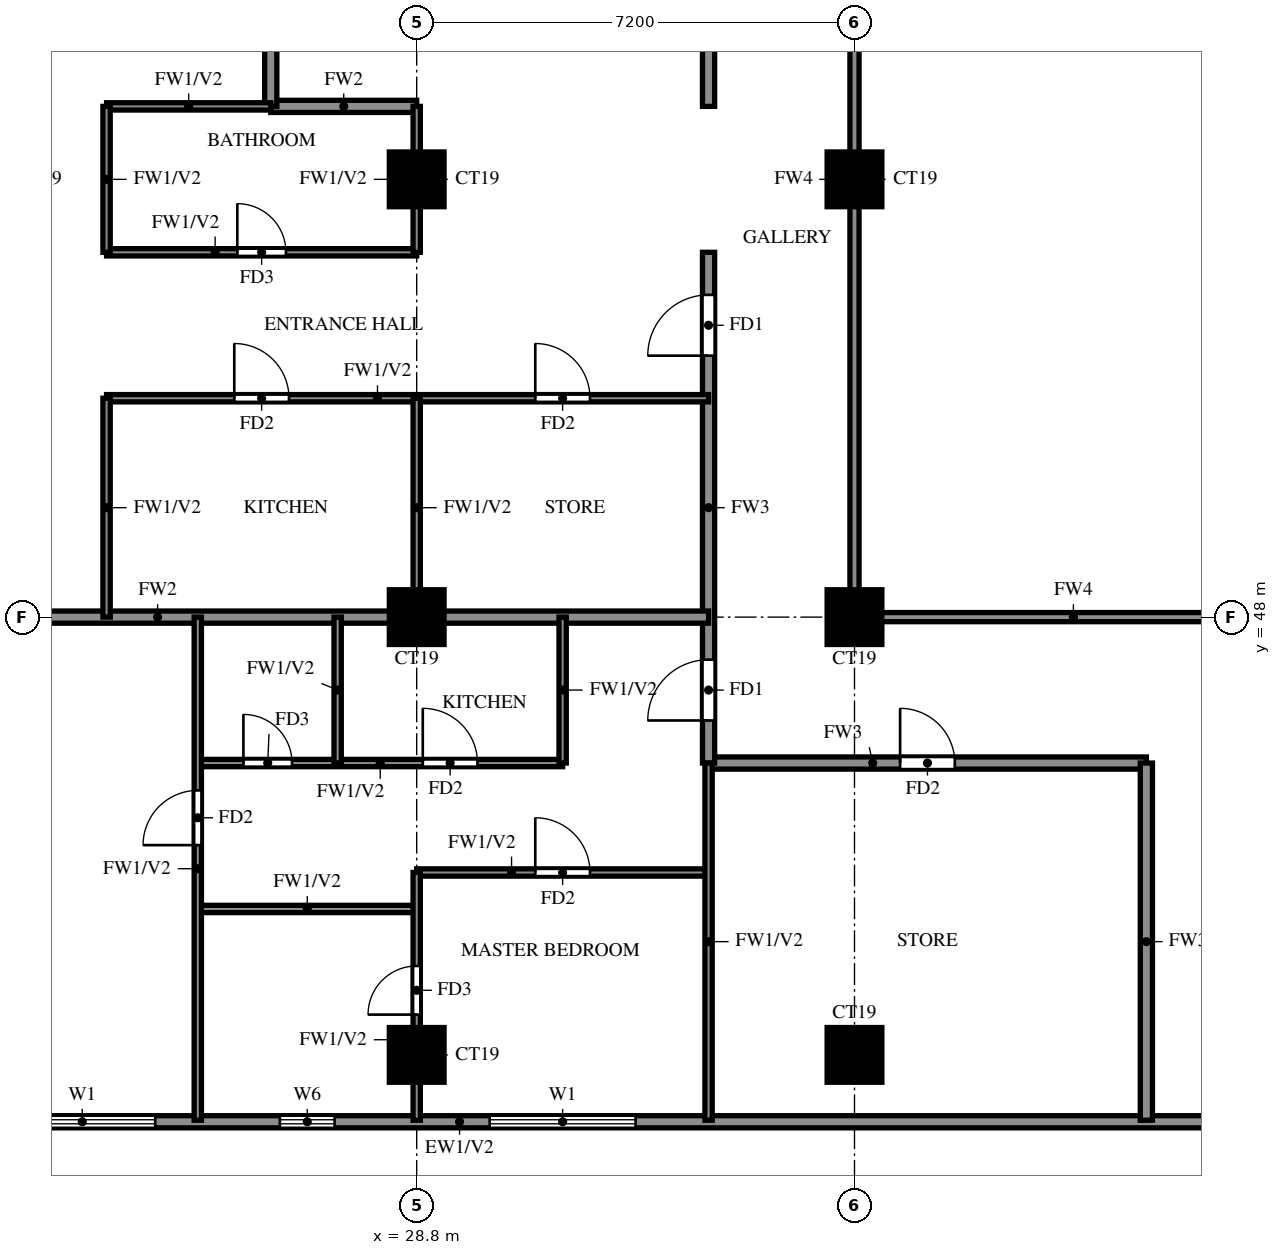
"""IFC4 building model, lengths in metres.
Left out: names, types, materials, properties, quantities, classifications, styles, units other than length and angle.
Written with IfcOpenShell. Run it as: python <this file> out.ifc"""

import sys

from ifc_helpers import new_model, si_unit, direction, frame, frame_2d, origin, origin_2d, place, context, subcontext, project, spatial, rectangle, extrude, source, transform, mapped, element, fill, save


model = new_model("IFC4")
c1 = context("Model", 3, precision=1e-05, world=origin(), true_north=direction((0.0, 1.0)))
c2 = subcontext(c1, "Body", "Model", "MODEL_VIEW")
j1 = project(units=[si_unit("LENGTHUNIT", "METRE"), si_unit("PLANEANGLEUNIT", "RADIAN")], contexts=[c1])
p1 = place(None, origin())
s1 = spatial("IfcSite", under=j1, at=p1, CompositionType="ELEMENT")
p2 = place(p1, origin())
s2 = spatial("IfcBuilding", under=s1, at=p2, CompositionType="ELEMENT")
p3 = place(p2, frame((0.0, 0.0, 185.0)))
s3 = spatial("IfcBuildingStorey", under=s2, at=p3, CompositionType="ELEMENT", Elevation=185.0)
m1 = source(origin(), c2, "Body", "SweptSolid", [
    extrude(rectangle(XDim=0.9, YDim=0.9, at=origin_2d()), origin(), (0.0, 0.0, 1.0), 3.2),
])
for number, where, z_axis, x_axis in (
    (1, (28.8, 40.8, 0.0), (0.0, 0.0, 1.0), (1.0, 0.0, 0.0)),
    (2, (36.0, 40.8, 0.0), (0.0, 0.0, 1.0), (1.0, 0.0, 0.0)),
    (3, (28.8, 48.0, 0.0), (0.0, 0.0, 1.0), (1.0, 0.0, 0.0)),
    (4, (36.0, 48.0, 0.0), (0.0, 0.0, 1.0), (1.0, 0.0, 0.0)),
    (5, (28.8, 55.2, 0.0), (0.0, 0.0, 1.0), (1.0, 0.0, 0.0)),
    (6, (36.0, 55.2, 0.0), (0.0, 0.0, 1.0), (1.0, 0.0, 0.0)),
):
    element("IfcColumn", number, at=place(p3, frame(where, z_axis=z_axis, x_axis=x_axis)), inside=s3, PredefinedType="COLUMN", context=c2, shape_type="MappedRepresentation", body=[
        mapped(m1, transform((0.0, 0.0, 0.0))),
    ])
p4 = place(p3, frame((18.2, 39.7, 0.0), z_axis=(0.0, 0.0, 1.0), x_axis=(1.0, 0.0, 0.0)))
e7 = element("IfcWall", 7, at=p4, inside=s3, PredefinedType="SOLIDWALL", context=c2, shape_type="SweptSolid", body=[
    extrude(rectangle(XDim=23.8, YDim=0.2, at=frame_2d((11.9, 0.0))), origin(), (0.0, 0.0, 1.0), 3.2),
])
p5 = place(p4, frame((0.9, 0.0, 0.6)))
e8 = element("IfcOpeningElement", 8, at=p5, cuts=e7, PredefinedType="OPENING", context=c2, shape_type="SweptSolid", body=[
    extrude(rectangle(XDim=2.4, YDim=2.4, at=frame_2d((1.2, 1.2))), frame((0.0, 0.11, 0.0), z_axis=(0.0, -1.0, 0.0), x_axis=(1.0, 0.0, 0.0)), (0.0, 0.0, 1.0), 0.22),
])
p6 = place(p4, frame((3.9, 0.0, 0.6)))
e9 = element("IfcOpeningElement", 9, at=p6, cuts=e7, PredefinedType="OPENING", context=c2, shape_type="SweptSolid", body=[
    extrude(rectangle(XDim=2.4, YDim=2.4, at=frame_2d((1.2, 1.2))), frame((0.0, 0.11, 0.0), z_axis=(0.0, -1.0, 0.0), x_axis=(1.0, 0.0, 0.0)), (0.0, 0.0, 1.0), 0.22),
])
p7 = place(p4, frame((11.8, 0.0, 0.6)))
e10 = element("IfcOpeningElement", 10, at=p7, cuts=e7, PredefinedType="OPENING", context=c2, shape_type="SweptSolid", body=[
    extrude(rectangle(XDim=2.4, YDim=2.4, at=frame_2d((1.2, 1.2))), frame((0.0, 0.11, 0.0), z_axis=(0.0, -1.0, 0.0), x_axis=(1.0, 0.0, 0.0)), (0.0, 0.0, 1.0), 0.22),
])
p8 = place(p4, frame((8.35, 0.0, 1.5)))
e11 = element("IfcOpeningElement", 11, at=p8, cuts=e7, PredefinedType="OPENING", context=c2, shape_type="SweptSolid", body=[
    extrude(rectangle(XDim=0.9, YDim=0.9, at=frame_2d((0.45, 0.45))), frame((0.0, 0.11, 0.0), z_axis=(0.0, -1.0, 0.0), x_axis=(1.0, 0.0, 0.0)), (0.0, 0.0, 1.0), 0.22),
])
p9 = place(p3, frame((33.6, 45.6, 0.0), z_axis=(0.0, 0.0, 1.0), x_axis=(1.0, 0.0, 0.0)))
e12 = element("IfcWall", 12, at=p9, inside=s3, PredefinedType="SOLIDWALL", context=c2, shape_type="SweptSolid", body=[
    extrude(rectangle(XDim=7.2, YDim=0.2, at=frame_2d((3.6, 0.0))), origin(), (0.0, 0.0, 1.0), 3.2),
])
p10 = place(p9, frame((3.15, 0.0, 0.0)))
e13 = element("IfcOpeningElement", 13, at=p10, cuts=e12, PredefinedType="OPENING", context=c2, shape_type="SweptSolid", body=[
    extrude(rectangle(XDim=0.9, YDim=2.1, at=frame_2d((0.45, 1.05))), frame((0.0, 0.11, 0.0), z_axis=(0.0, -1.0, 0.0), x_axis=(1.0, 0.0, 0.0)), (0.0, 0.0, 1.0), 0.22),
])
p11 = place(p3, frame((33.6, 45.6, 0.0), z_axis=(0.0, 0.0, 1.0), x_axis=(0.0, 1.0, 0.0)))
e14 = element("IfcWall", 14, at=p11, inside=s3, PredefinedType="SOLIDWALL", context=c2, shape_type="SweptSolid", body=[
    extrude(rectangle(XDim=8.4, YDim=0.2, at=frame_2d((4.2, 0.0))), origin(), (0.0, 0.0, 1.0), 3.2),
])
p12 = place(p11, frame((0.7, 0.0, 0.0)))
e15 = element("IfcOpeningElement", 15, at=p12, cuts=e14, PredefinedType="OPENING", context=c2, shape_type="SweptSolid", body=[
    extrude(rectangle(XDim=1.0, YDim=2.1, at=frame_2d((0.5, 1.05))), frame((0.0, 0.11, 0.0), z_axis=(0.0, -1.0, 0.0), x_axis=(1.0, 0.0, 0.0)), (0.0, 0.0, 1.0), 0.22),
])
p13 = place(p11, frame((6.7, 0.0, 0.0)))
e16 = element("IfcOpeningElement", 16, at=p13, cuts=e14, PredefinedType="OPENING", context=c2, shape_type="SweptSolid", body=[
    extrude(rectangle(XDim=1.0, YDim=2.1, at=frame_2d((0.5, 1.05))), frame((0.0, 0.11, 0.0), z_axis=(0.0, -1.0, 0.0), x_axis=(1.0, 0.0, 0.0)), (0.0, 0.0, 1.0), 0.22),
])
p14 = place(p3, frame((33.6, 56.4, 0.0), z_axis=(0.0, 0.0, 1.0), x_axis=(0.0, 1.0, 0.0)))
e17 = element("IfcWall", 17, at=p14, inside=s3, PredefinedType="SOLIDWALL", context=c2, shape_type="SweptSolid", body=[
    extrude(rectangle(XDim=6.0, YDim=0.2, at=frame_2d((3.0, 0.0))), origin(), (0.0, 0.0, 1.0), 3.2),
])
p15 = place(p14, frame((3.7, 0.0, 0.0)))
e18 = element("IfcOpeningElement", 18, at=p15, cuts=e17, PredefinedType="OPENING", context=c2, shape_type="SweptSolid", body=[
    extrude(rectangle(XDim=1.0, YDim=2.1, at=frame_2d((0.5, 1.05))), frame((0.0, 0.11, 0.0), z_axis=(0.0, -1.0, 0.0), x_axis=(1.0, 0.0, 0.0)), (0.0, 0.0, 1.0), 0.22),
])
p16 = place(p3, frame((40.8, 39.725, 0.0), z_axis=(0.0, 0.0, 1.0), x_axis=(0.0, 1.0, 0.0)))
e19 = element("IfcWall", 19, at=p16, inside=s3, PredefinedType="SOLIDWALL", context=c2, shape_type="SweptSolid", body=[
    extrude(rectangle(XDim=5.875, YDim=0.2, at=frame_2d((2.938, 0.0))), origin(), (0.0, 0.0, 1.0), 3.2),
])
p17 = place(p3, frame((14.525, 48.0, 0.0), z_axis=(0.0, 0.0, 1.0), x_axis=(1.0, 0.0, 0.0)))
e20 = element("IfcWall", 20, at=p17, inside=s3, PredefinedType="SOLIDWALL", context=c2, shape_type="SweptSolid", body=[
    extrude(rectangle(XDim=19.075, YDim=0.2, at=frame_2d((9.538, 0.0))), origin(), (0.0, 0.0, 1.0), 3.2),
])
for number, where, z_axis, x_axis in (
    (21, (26.4, 56.4, 0.0), (0.0, 0.0, 1.0), (1.0, 0.0, 0.0)),
    (22, (26.4, 56.4, 0.0), (0.0, 0.0, 1.0), (0.0, 1.0, 0.0)),
):
    element("IfcWall", number, at=place(p3, frame(where, z_axis=z_axis, x_axis=x_axis)), inside=s3, PredefinedType="SOLIDWALL", context=c2, shape_type="SweptSolid", body=[
        extrude(rectangle(XDim=2.4, YDim=0.2, at=frame_2d((1.2, 0.0))), origin(), (0.0, 0.0, 1.0), 3.2),
    ])
p18 = place(p3, frame((25.2, 43.2, 0.0), z_axis=(0.0, 0.0, 1.0), x_axis=(1.0, 0.0, 0.0)))
e23 = element("IfcWall", 23, at=p18, inside=s3, PredefinedType="PARTITIONING", context=c2, shape_type="SweptSolid", body=[
    extrude(rectangle(XDim=3.6, YDim=0.12, at=frame_2d((1.8, 0.0))), origin(), (0.0, 0.0, 1.0), 3.2),
])
p19 = place(p3, frame((28.8, 43.8, 0.0), z_axis=(0.0, 0.0, 1.0), x_axis=(1.0, 0.0, 0.0)))
e24 = element("IfcWall", 24, at=p19, inside=s3, PredefinedType="PARTITIONING", context=c2, shape_type="SweptSolid", body=[
    extrude(rectangle(XDim=4.8, YDim=0.12, at=frame_2d((2.4, 0.0))), origin(), (0.0, 0.0, 1.0), 3.2),
])
p20 = place(p19, frame((1.95, 0.0, 0.0)))
e25 = element("IfcOpeningElement", 25, at=p20, cuts=e24, PredefinedType="OPENING", context=c2, shape_type="SweptSolid", body=[
    extrude(rectangle(XDim=0.9, YDim=2.1, at=frame_2d((0.45, 1.05))), frame((0.0, 0.07, 0.0), z_axis=(0.0, -1.0, 0.0), x_axis=(1.0, 0.0, 0.0)), (0.0, 0.0, 1.0), 0.14),
])
p21 = place(p3, frame((25.2, 45.6, 0.0), z_axis=(0.0, 0.0, 1.0), x_axis=(1.0, 0.0, 0.0)))
e26 = element("IfcWall", 26, at=p21, inside=s3, PredefinedType="PARTITIONING", context=c2, shape_type="SweptSolid", body=[
    extrude(rectangle(XDim=6.0, YDim=0.12, at=frame_2d((3.0, 0.0))), origin(), (0.0, 0.0, 1.0), 3.2),
])
p22 = place(p21, frame((0.75, 0.0, 0.0)))
e27 = element("IfcOpeningElement", 27, at=p22, cuts=e26, PredefinedType="OPENING", context=c2, shape_type="SweptSolid", body=[
    extrude(rectangle(XDim=0.8, YDim=2.1, at=frame_2d((0.4, 1.05))), frame((0.0, 0.07, 0.0), z_axis=(0.0, -1.0, 0.0), x_axis=(1.0, 0.0, 0.0)), (0.0, 0.0, 1.0), 0.14),
])
p23 = place(p21, frame((3.7, 0.0, 0.0)))
e28 = element("IfcOpeningElement", 28, at=p23, cuts=e26, PredefinedType="OPENING", context=c2, shape_type="SweptSolid", body=[
    extrude(rectangle(XDim=0.9, YDim=2.1, at=frame_2d((0.45, 1.05))), frame((0.0, 0.07, 0.0), z_axis=(0.0, -1.0, 0.0), x_axis=(1.0, 0.0, 0.0)), (0.0, 0.0, 1.0), 0.14),
])
p24 = place(p3, frame((23.7, 51.6, 0.0), z_axis=(0.0, 0.0, 1.0), x_axis=(1.0, 0.0, 0.0)))
e29 = element("IfcWall", 29, at=p24, inside=s3, PredefinedType="PARTITIONING", context=c2, shape_type="SweptSolid", body=[
    extrude(rectangle(XDim=9.9, YDim=0.12, at=frame_2d((4.95, 0.0))), origin(), (0.0, 0.0, 1.0), 3.2),
])
p25 = place(p24, frame((2.1, 0.0, 0.0)))
e30 = element("IfcOpeningElement", 30, at=p25, cuts=e29, PredefinedType="OPENING", context=c2, shape_type="SweptSolid", body=[
    extrude(rectangle(XDim=0.9, YDim=2.1, at=frame_2d((0.45, 1.05))), frame((0.0, 0.07, 0.0), z_axis=(0.0, -1.0, 0.0), x_axis=(1.0, 0.0, 0.0)), (0.0, 0.0, 1.0), 0.14),
])
p26 = place(p24, frame((7.05, 0.0, 0.0)))
e31 = element("IfcOpeningElement", 31, at=p26, cuts=e29, PredefinedType="OPENING", context=c2, shape_type="SweptSolid", body=[
    extrude(rectangle(XDim=0.9, YDim=2.1, at=frame_2d((0.45, 1.05))), frame((0.0, 0.07, 0.0), z_axis=(0.0, -1.0, 0.0), x_axis=(1.0, 0.0, 0.0)), (0.0, 0.0, 1.0), 0.14),
])
p27 = place(p3, frame((23.7, 54.0, 0.0), z_axis=(0.0, 0.0, 1.0), x_axis=(1.0, 0.0, 0.0)))
e32 = element("IfcWall", 32, at=p27, inside=s3, PredefinedType="PARTITIONING", context=c2, shape_type="SweptSolid", body=[
    extrude(rectangle(XDim=5.1, YDim=0.12, at=frame_2d((2.55, 0.0))), origin(), (0.0, 0.0, 1.0), 3.2),
])
p28 = place(p27, frame((2.15, 0.0, 0.0)))
e33 = element("IfcOpeningElement", 33, at=p28, cuts=e32, PredefinedType="OPENING", context=c2, shape_type="SweptSolid", body=[
    extrude(rectangle(XDim=0.8, YDim=2.1, at=frame_2d((0.4, 1.05))), frame((0.0, 0.07, 0.0), z_axis=(0.0, -1.0, 0.0), x_axis=(1.0, 0.0, 0.0)), (0.0, 0.0, 1.0), 0.14),
])
p29 = place(p3, frame((23.7, 56.4, 0.0), z_axis=(0.0, 0.0, 1.0), x_axis=(1.0, 0.0, 0.0)))
e34 = element("IfcWall", 34, at=p29, inside=s3, PredefinedType="PARTITIONING", context=c2, shape_type="SweptSolid", body=[
    extrude(rectangle(XDim=2.7, YDim=0.12, at=frame_2d((1.35, 0.0))), origin(), (0.0, 0.0, 1.0), 3.2),
])
p30 = place(p3, frame((23.7, 48.0, 0.0), z_axis=(0.0, 0.0, 1.0), x_axis=(0.0, 1.0, 0.0)))
e35 = element("IfcWall", 35, at=p30, inside=s3, PredefinedType="PARTITIONING", context=c2, shape_type="SweptSolid", body=[
    extrude(rectangle(XDim=3.6, YDim=0.12, at=frame_2d((1.8, 0.0))), origin(), (0.0, 0.0, 1.0), 3.2),
])
p31 = place(p3, frame((23.7, 54.0, 0.0), z_axis=(0.0, 0.0, 1.0), x_axis=(0.0, 1.0, 0.0)))
e36 = element("IfcWall", 36, at=p31, inside=s3, PredefinedType="PARTITIONING", context=c2, shape_type="SweptSolid", body=[
    extrude(rectangle(XDim=2.4, YDim=0.12, at=frame_2d((1.2, 0.0))), origin(), (0.0, 0.0, 1.0), 3.2),
])
p32 = place(p3, frame((25.2, 39.725, 0.0), z_axis=(0.0, 0.0, 1.0), x_axis=(0.0, 1.0, 0.0)))
e37 = element("IfcWall", 37, at=p32, inside=s3, PredefinedType="PARTITIONING", context=c2, shape_type="SweptSolid", body=[
    extrude(rectangle(XDim=8.275, YDim=0.12, at=frame_2d((4.137, 0.0))), origin(), (0.0, 0.0, 1.0), 3.2),
])
p33 = place(p32, frame((4.525, 0.0, 0.0)))
e38 = element("IfcOpeningElement", 38, at=p33, cuts=e37, PredefinedType="OPENING", context=c2, shape_type="SweptSolid", body=[
    extrude(rectangle(XDim=0.9, YDim=2.1, at=frame_2d((0.45, 1.05))), frame((0.0, 0.07, 0.0), z_axis=(0.0, -1.0, 0.0), x_axis=(1.0, 0.0, 0.0)), (0.0, 0.0, 1.0), 0.14),
])
p34 = place(p3, frame((27.5, 45.6, 0.0), z_axis=(0.0, 0.0, 1.0), x_axis=(0.0, 1.0, 0.0)))
e39 = element("IfcWall", 39, at=p34, inside=s3, PredefinedType="PARTITIONING", context=c2, shape_type="SweptSolid", body=[
    extrude(rectangle(XDim=2.4, YDim=0.12, at=frame_2d((1.2, 0.0))), origin(), (0.0, 0.0, 1.0), 3.2),
])
p35 = place(p3, frame((28.8, 39.725, 0.0), z_axis=(0.0, 0.0, 1.0), x_axis=(0.0, 1.0, 0.0)))
e40 = element("IfcWall", 40, at=p35, inside=s3, PredefinedType="PARTITIONING", context=c2, shape_type="SweptSolid", body=[
    extrude(rectangle(XDim=4.075, YDim=0.12, at=frame_2d((2.038, 0.0))), origin(), (0.0, 0.0, 1.0), 3.2),
])
p36 = place(p35, frame((1.738, 0.0, 0.0)))
e41 = element("IfcOpeningElement", 41, at=p36, cuts=e40, PredefinedType="OPENING", context=c2, shape_type="SweptSolid", body=[
    extrude(rectangle(XDim=0.8, YDim=2.1, at=frame_2d((0.4, 1.05))), frame((0.0, 0.07, 0.0), z_axis=(0.0, -1.0, 0.0), x_axis=(1.0, 0.0, 0.0)), (0.0, 0.0, 1.0), 0.14),
])
p37 = place(p3, frame((28.8, 48.0, 0.0), z_axis=(0.0, 0.0, 1.0), x_axis=(0.0, 1.0, 0.0)))
e42 = element("IfcWall", 42, at=p37, inside=s3, PredefinedType="PARTITIONING", context=c2, shape_type="SweptSolid", body=[
    extrude(rectangle(XDim=3.6, YDim=0.12, at=frame_2d((1.8, 0.0))), origin(), (0.0, 0.0, 1.0), 3.2),
])
for number, where, z_axis, x_axis in (
    (43, (28.8, 54.0, 0.0), (0.0, 0.0, 1.0), (0.0, 1.0, 0.0)),
    (44, (31.2, 45.6, 0.0), (0.0, 0.0, 1.0), (0.0, 1.0, 0.0)),
):
    element("IfcWall", number, at=place(p3, frame(where, z_axis=z_axis, x_axis=x_axis)), inside=s3, PredefinedType="PARTITIONING", context=c2, shape_type="SweptSolid", body=[
        extrude(rectangle(XDim=2.4, YDim=0.12, at=frame_2d((1.2, 0.0))), origin(), (0.0, 0.0, 1.0), 3.2),
    ])
p38 = place(p3, frame((33.6, 39.725, 0.0), z_axis=(0.0, 0.0, 1.0), x_axis=(0.0, 1.0, 0.0)))
e45 = element("IfcWall", 45, at=p38, inside=s3, PredefinedType="PARTITIONING", context=c2, shape_type="SweptSolid", body=[
    extrude(rectangle(XDim=5.875, YDim=0.12, at=frame_2d((2.938, 0.0))), origin(), (0.0, 0.0, 1.0), 3.2),
])
p39 = place(p3, frame((36.0, 48.0, 0.0), z_axis=(0.0, 0.0, 1.0), x_axis=(1.0, 0.0, 0.0)))
e46 = element("IfcWall", 46, at=p39, inside=s3, PredefinedType="SOLIDWALL", context=c2, shape_type="SweptSolid", body=[
    extrude(rectangle(XDim=7.2, YDim=0.15, at=frame_2d((3.6, 0.0))), origin(), (0.0, 0.0, 1.0), 2.3),
])
p40 = place(p3, frame((36.0, 48.0, 0.0), z_axis=(0.0, 0.0, 1.0), x_axis=(0.0, 1.0, 0.0)))
e47 = element("IfcWall", 47, at=p40, inside=s3, PredefinedType="SOLIDWALL", context=c2, shape_type="SweptSolid", body=[
    extrude(rectangle(XDim=14.4, YDim=0.15, at=frame_2d((7.2, 0.0))), origin(), (0.0, 0.0, 1.0), 2.3),
])
p41 = place(p6, origin())
e48 = element("IfcWindow", 48, at=p41, inside=s3, PartitioningType="DOUBLE_PANEL_VERTICAL", PredefinedType="WINDOW", context=c2, shape_type="SweptSolid", body=[
    extrude(rectangle(XDim=2.4, YDim=2.4, at=frame_2d((1.2, 1.2))), frame((0.0, 0.03, 0.0), z_axis=(0.0, -1.0, 0.0), x_axis=(1.0, 0.0, 0.0)), (0.0, 0.0, 1.0), 0.06),
])
fill(e9, e48)
p42 = place(p7, origin())
e49 = element("IfcWindow", 49, at=p42, inside=s3, PartitioningType="DOUBLE_PANEL_VERTICAL", PredefinedType="WINDOW", context=c2, shape_type="SweptSolid", body=[
    extrude(rectangle(XDim=2.4, YDim=2.4, at=frame_2d((1.2, 1.2))), frame((0.0, 0.03, 0.0), z_axis=(0.0, -1.0, 0.0), x_axis=(1.0, 0.0, 0.0)), (0.0, 0.0, 1.0), 0.06),
])
fill(e10, e49)
p43 = place(p8, origin())
e50 = element("IfcWindow", 50, at=p43, inside=s3, PartitioningType="SINGLE_PANEL", PredefinedType="WINDOW", context=c2, shape_type="SweptSolid", body=[
    extrude(rectangle(XDim=0.9, YDim=0.9, at=frame_2d((0.45, 0.45))), frame((0.0, 0.03, 0.0), z_axis=(0.0, -1.0, 0.0), x_axis=(1.0, 0.0, 0.0)), (0.0, 0.0, 1.0), 0.06),
])
fill(e11, e50)
p44 = place(p12, origin())
e51 = element("IfcDoor", 51, at=p44, inside=s3, OperationType="SINGLE_SWING_LEFT", PredefinedType="DOOR", context=c2, shape_type="SweptSolid", body=[
    extrude(rectangle(XDim=1.0, YDim=2.1, at=frame_2d((0.5, 1.05))), frame((0.0, 0.025, 0.0), z_axis=(0.0, -1.0, 0.0), x_axis=(1.0, 0.0, 0.0)), (0.0, 0.0, 1.0), 0.05),
])
fill(e15, e51)
p45 = place(p33, origin())
e52 = element("IfcDoor", 52, at=p45, inside=s3, OperationType="SINGLE_SWING_LEFT", PredefinedType="DOOR", context=c2, shape_type="SweptSolid", body=[
    extrude(rectangle(XDim=0.9, YDim=2.1, at=frame_2d((0.45, 1.05))), frame((0.0, 0.025, 0.0), z_axis=(0.0, -1.0, 0.0), x_axis=(1.0, 0.0, 0.0)), (0.0, 0.0, 1.0), 0.05),
])
fill(e38, e52)
p46 = place(p20, origin())
e53 = element("IfcDoor", 53, at=p46, inside=s3, OperationType="SINGLE_SWING_RIGHT", PredefinedType="DOOR", context=c2, shape_type="SweptSolid", body=[
    extrude(rectangle(XDim=0.9, YDim=2.1, at=frame_2d((0.45, 1.05))), frame((0.0, 0.025, 0.0), z_axis=(0.0, -1.0, 0.0), x_axis=(1.0, 0.0, 0.0)), (0.0, 0.0, 1.0), 0.05),
])
fill(e25, e53)
p47 = place(p36, origin())
e54 = element("IfcDoor", 54, at=p47, inside=s3, OperationType="SINGLE_SWING_RIGHT", PredefinedType="DOOR", context=c2, shape_type="SweptSolid", body=[
    extrude(rectangle(XDim=0.8, YDim=2.1, at=frame_2d((0.4, 1.05))), frame((0.0, 0.025, 0.0), z_axis=(0.0, -1.0, 0.0), x_axis=(1.0, 0.0, 0.0)), (0.0, 0.0, 1.0), 0.05),
])
fill(e41, e54)
p48 = place(p22, origin())
e55 = element("IfcDoor", 55, at=p48, inside=s3, OperationType="SINGLE_SWING_LEFT", PredefinedType="DOOR", context=c2, shape_type="SweptSolid", body=[
    extrude(rectangle(XDim=0.8, YDim=2.1, at=frame_2d((0.4, 1.05))), frame((0.0, 0.025, 0.0), z_axis=(0.0, -1.0, 0.0), x_axis=(1.0, 0.0, 0.0)), (0.0, 0.0, 1.0), 0.05),
])
fill(e27, e55)
p49 = place(p23, origin())
e56 = element("IfcDoor", 56, at=p49, inside=s3, OperationType="SINGLE_SWING_RIGHT", PredefinedType="DOOR", context=c2, shape_type="SweptSolid", body=[
    extrude(rectangle(XDim=0.9, YDim=2.1, at=frame_2d((0.45, 1.05))), frame((0.0, 0.025, 0.0), z_axis=(0.0, -1.0, 0.0), x_axis=(1.0, 0.0, 0.0)), (0.0, 0.0, 1.0), 0.05),
])
fill(e28, e56)
p50 = place(p10, origin())
e57 = element("IfcDoor", 57, at=p50, inside=s3, OperationType="SINGLE_SWING_LEFT", PredefinedType="DOOR", context=c2, shape_type="SweptSolid", body=[
    extrude(rectangle(XDim=0.9, YDim=2.1, at=frame_2d((0.45, 1.05))), frame((0.0, 0.025, 0.0), z_axis=(0.0, -1.0, 0.0), x_axis=(1.0, 0.0, 0.0)), (0.0, 0.0, 1.0), 0.05),
])
fill(e13, e57)
p51 = place(p13, origin())
e58 = element("IfcDoor", 58, at=p51, inside=s3, OperationType="SINGLE_SWING_LEFT", PredefinedType="DOOR", context=c2, shape_type="SweptSolid", body=[
    extrude(rectangle(XDim=1.0, YDim=2.1, at=frame_2d((0.5, 1.05))), frame((0.0, 0.025, 0.0), z_axis=(0.0, -1.0, 0.0), x_axis=(1.0, 0.0, 0.0)), (0.0, 0.0, 1.0), 0.05),
])
fill(e16, e58)
p52 = place(p25, origin())
e59 = element("IfcDoor", 59, at=p52, inside=s3, OperationType="SINGLE_SWING_RIGHT", PredefinedType="DOOR", context=c2, shape_type="SweptSolid", body=[
    extrude(rectangle(XDim=0.9, YDim=2.1, at=frame_2d((0.45, 1.05))), frame((0.0, 0.025, 0.0), z_axis=(0.0, -1.0, 0.0), x_axis=(1.0, 0.0, 0.0)), (0.0, 0.0, 1.0), 0.05),
])
fill(e30, e59)
p53 = place(p28, origin())
e60 = element("IfcDoor", 60, at=p53, inside=s3, OperationType="SINGLE_SWING_LEFT", PredefinedType="DOOR", context=c2, shape_type="SweptSolid", body=[
    extrude(rectangle(XDim=0.8, YDim=2.1, at=frame_2d((0.4, 1.05))), frame((0.0, 0.025, 0.0), z_axis=(0.0, -1.0, 0.0), x_axis=(1.0, 0.0, 0.0)), (0.0, 0.0, 1.0), 0.05),
])
fill(e33, e60)
p54 = place(p26, origin())
e61 = element("IfcDoor", 61, at=p54, inside=s3, OperationType="SINGLE_SWING_LEFT", PredefinedType="DOOR", context=c2, shape_type="SweptSolid", body=[
    extrude(rectangle(XDim=0.9, YDim=2.1, at=frame_2d((0.45, 1.05))), frame((0.0, 0.025, 0.0), z_axis=(0.0, -1.0, 0.0), x_axis=(1.0, 0.0, 0.0)), (0.0, 0.0, 1.0), 0.05),
])
fill(e31, e61)
save(model, sys.argv[1])
